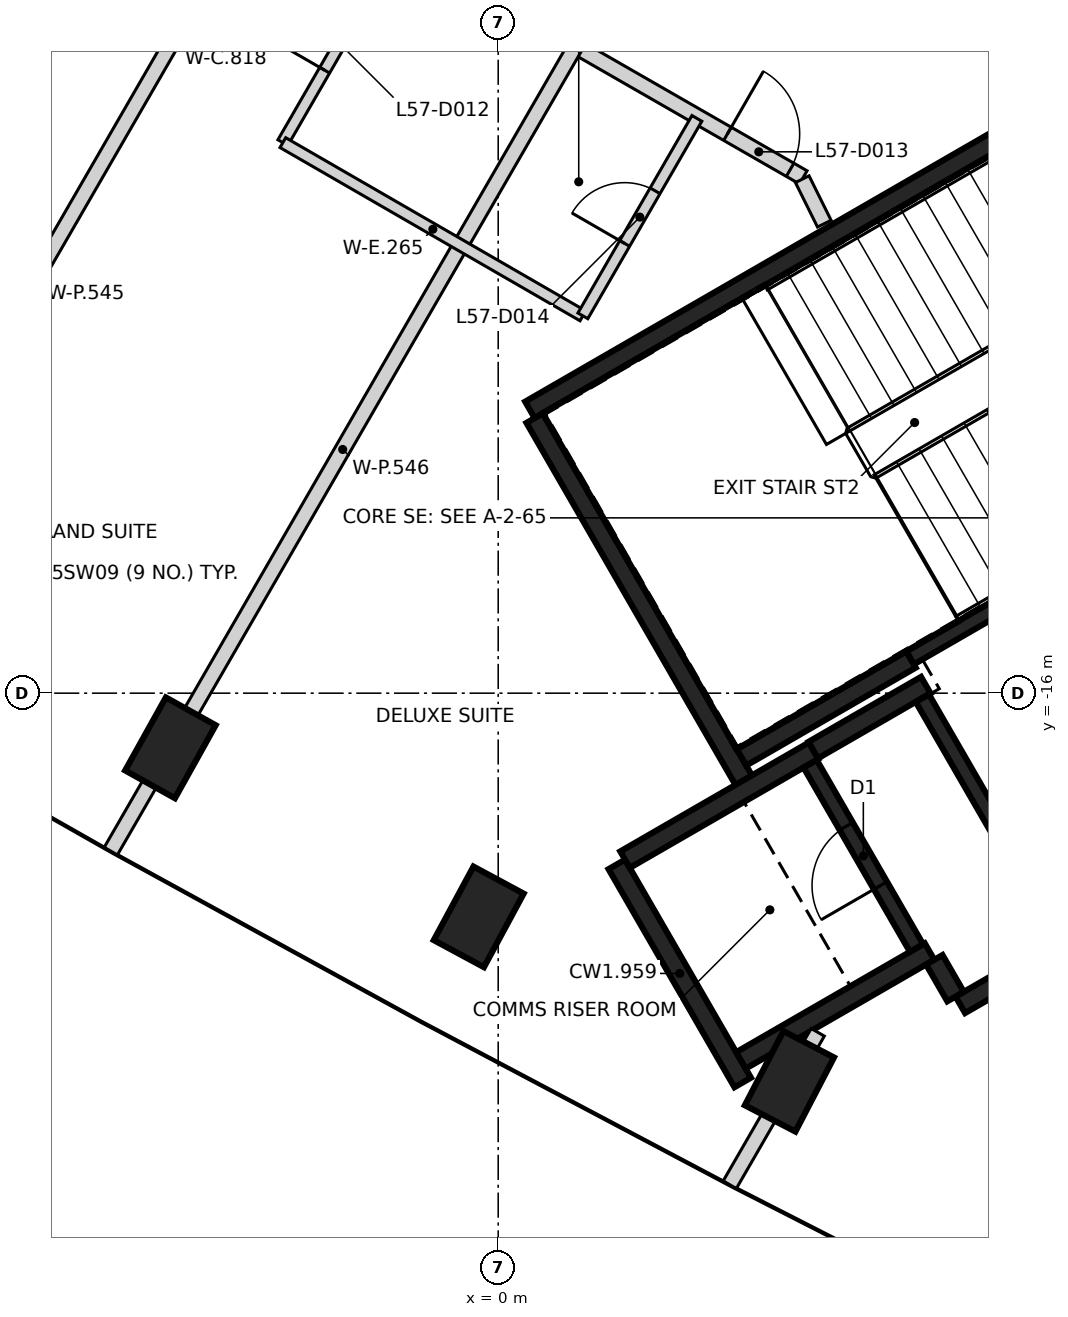
"""IFC4 building model, lengths in metres.
Left out: names, types, materials, properties, quantities, classifications, styles, units other than length and angle.
Written with IfcOpenShell. Run it as: python <this file> out.ifc"""

import sys

from ifc_helpers import new_model, si_unit, direction, frame, frame_2d, origin, origin_2d, place, context, subcontext, project, spatial, rectangle, extrude, element, fill, save


model = new_model("IFC4")
c1 = context("Model", 3, precision=1e-05, world=origin(), true_north=direction((0.0, 1.0)))
c2 = subcontext(c1, "Body", "Model", "MODEL_VIEW")
j1 = project(units=[si_unit("LENGTHUNIT", "METRE"), si_unit("PLANEANGLEUNIT", "RADIAN")], contexts=[c1])
p1 = place(None, origin())
s1 = spatial("IfcSite", under=j1, at=p1, CompositionType="ELEMENT")
p2 = place(p1, origin())
s2 = spatial("IfcBuilding", under=s1, at=p2, CompositionType="ELEMENT")
p3 = place(p2, frame((0.0, 0.0, 228.6)))
s3 = spatial("IfcBuildingStorey", under=s2, at=p3, CompositionType="ELEMENT", Elevation=228.6)
for number, where, z_axis, x_axis in (
    (1, (-4.312, -16.719, -0.35), (0.0, 0.0, 1.0), (0.487, 0.873, 0.0)),
    (2, (-0.256, -18.943, -0.35), (0.0, 0.0, 1.0), (0.475, 0.88, 0.0)),
    (3, (3.832, -21.107, -0.35), (0.0, 0.0, 1.0), (0.461, 0.887, 0.0)),
):
    element("IfcColumn", number, at=place(p3, frame(where, z_axis=z_axis, x_axis=x_axis)), inside=s3, PredefinedType="COLUMN", context=c2, shape_type="SweptSolid", body=[
        extrude(rectangle(XDim=1.1, YDim=0.75, at=origin_2d()), origin(), (0.0, 0.0, 1.0), 3.6),
    ])
p4 = place(p3, frame((0.417, -12.273, 0.0), z_axis=(0.0, 0.0, 1.0), x_axis=(0.866021906294, 0.500006057782, 0.0)))
e4 = element("IfcWall", 4, at=p4, inside=s3, PredefinedType="SHEAR", context=c2, shape_type="SweptSolid", body=[
    extrude(rectangle(XDim=11.55, YDim=0.25, at=frame_2d((5.775, 0.0))), origin(), (0.0, 0.0, 1.0), 3.25),
])
p5 = place(p4, frame((10.025, 0.0, 0.0)))
e5 = element("IfcOpeningElement", 5, at=p5, cuts=e4, PredefinedType="OPENING", context=c2, shape_type="SweptSolid", body=[
    extrude(rectangle(XDim=1.2, YDim=2.1, at=frame_2d((0.6, 1.05))), frame((0.0, 0.135, 0.0), z_axis=(0.0, -1.0, 0.0), x_axis=(1.0, 0.0, 0.0)), (0.0, 0.0, 1.0), 0.27),
])
p6 = place(p4, frame((8.725, 0.0, 0.0)))
e6 = element("IfcOpeningElement", 6, at=p6, cuts=e4, PredefinedType="OPENING", context=c2, shape_type="SweptSolid", body=[
    extrude(rectangle(XDim=1.2, YDim=2.1, at=frame_2d((0.6, 1.05))), frame((0.0, 0.135, 0.0), z_axis=(0.0, -1.0, 0.0), x_axis=(1.0, 0.0, 0.0)), (0.0, 0.0, 1.0), 0.27),
])
p7 = place(p3, frame((3.235, -17.153, 0.0), z_axis=(0.0, 0.0, 1.0), x_axis=(-0.500008851346, 0.866020293397, 0.0)))
e7 = element("IfcWall", 7, at=p7, inside=s3, PredefinedType="SHEAR", context=c2, shape_type="SweptSolid", body=[
    extrude(rectangle(XDim=5.51, YDim=0.25, at=frame_2d((2.755, 0.0))), origin(), (0.0, 0.0, 1.0), 3.25),
])
p8 = place(p3, frame((3.217, -21.122, 0.0), z_axis=(0.0, 0.0, 1.0), x_axis=(-0.499998874531, 0.866026053573, 0.0)))
e8 = element("IfcWall", 8, at=p8, inside=s3, PredefinedType="SHEAR", context=c2, shape_type="SweptSolid", body=[
    extrude(rectangle(XDim=3.313, YDim=0.25, at=frame_2d((1.656, 0.0))), origin(), (0.0, 0.0, 1.0), 3.25),
])
p9 = place(p3, frame((1.669, -18.19, 0.0), z_axis=(0.0, 0.0, 1.0), x_axis=(0.866042235819, 0.499970844928, 0.0)))
e9 = element("IfcWall", 9, at=p9, inside=s3, PredefinedType="SHEAR", context=c2, shape_type="SweptSolid", body=[
    extrude(rectangle(XDim=2.865, YDim=0.25, at=frame_2d((1.432, 0.0))), origin(), (0.0, 0.0, 1.0), 3.25),
])
p10 = place(p3, frame((5.675, -19.399, 0.0), z_axis=(0.0, 0.0, 1.0), x_axis=(-0.866026637627, -0.499997862916, 0.0)))
e10 = element("IfcWall", 10, at=p10, inside=s3, PredefinedType="SHEAR", context=c2, shape_type="SweptSolid", body=[
    extrude(rectangle(XDim=2.865, YDim=0.25, at=frame_2d((1.432, 0.0))), origin(), (0.0, 0.0, 1.0), 3.25),
])
p11 = place(p3, frame((5.431, -15.556, 0.0), z_axis=(0.0, 0.0, 1.0), x_axis=(-0.866022940537, -0.500004266446, 0.0)))
e11 = element("IfcWall", 11, at=p11, inside=s3, PredefinedType="SHEAR", context=c2, shape_type="SweptSolid", body=[
    extrude(rectangle(XDim=2.575, YDim=0.25, at=frame_2d((1.287, 0.0))), origin(), (0.0, 0.0, 1.0), 3.25),
])
p12 = place(p3, frame((4.145, -16.749, 0.0), z_axis=(0.0, 0.0, 1.0), x_axis=(0.866038183914, 0.499977863513, 0.0)))
e12 = element("IfcWall", 12, at=p12, inside=s3, PredefinedType="SHEAR", context=c2, shape_type="SweptSolid", body=[
    extrude(rectangle(XDim=1.71, YDim=0.25, at=frame_2d((0.855, 0.0))), origin(), (0.0, 0.0, 1.0), 3.25),
])
p13 = place(p3, frame((7.452, -19.308, 0.0), z_axis=(0.0, 0.0, 1.0), x_axis=(-0.866044474677, -0.49996696679, 0.0)))
e13 = element("IfcWall", 13, at=p13, inside=s3, PredefinedType="SHEAR", context=c2, shape_type="SweptSolid", body=[
    extrude(rectangle(XDim=1.584, YDim=0.25, at=frame_2d((0.792, 0.0))), origin(), (0.0, 0.0, 1.0), 3.25),
])
p14 = place(p3, frame((6.017, -19.992, 0.0), z_axis=(0.0, 0.0, 1.0), x_axis=(-0.500364886717, 0.865814633822, 0.0)))
e14 = element("IfcWall", 14, at=p14, inside=s3, PredefinedType="SHEAR", context=c2, shape_type="SweptSolid", body=[
    extrude(rectangle(XDim=0.559, YDim=0.25, at=frame_2d((0.28, 0.0))), origin(), (0.0, 0.0, 1.0), 3.25),
])
p15 = place(p3, frame((5.419, -15.534, 0.0), z_axis=(0.0, 0.0, 1.0), x_axis=(0.866029065029, 0.499993658486, 0.0)))
e15 = element("IfcWall", 15, at=p15, inside=s3, PredefinedType="SHEAR", context=c2, shape_type="SweptSolid", body=[
    extrude(rectangle(XDim=5.974, YDim=0.2, at=frame_2d((2.987, 0.0))), origin(), (0.0, 0.0, 1.0), 3.25),
])
p16 = place(p3, frame((5.503, -19.352, 0.0), z_axis=(0.0, 0.0, 1.0), x_axis=(-0.499986818241, 0.866033014143, 0.0)))
e16 = element("IfcWall", 16, at=p16, inside=s3, PredefinedType="SHEAR", context=c2, shape_type="SweptSolid", body=[
    extrude(rectangle(XDim=2.798, YDim=0.2, at=frame_2d((1.399, 0.0))), origin(), (0.0, 0.0, 1.0), 3.25),
])
p17 = place(p16, frame((0.949, 0.0, 0.0)))
e17 = element("IfcOpeningElement", 17, at=p17, cuts=e16, PredefinedType="OPENING", context=c2, shape_type="SweptSolid", body=[
    extrude(rectangle(XDim=0.9, YDim=2.1, at=frame_2d((0.45, 1.05))), frame((0.0, 0.11, 0.0), z_axis=(0.0, -1.0, 0.0), x_axis=(1.0, 0.0, 0.0)), (0.0, 0.0, 1.0), 0.22),
])
p18 = place(p3, frame((6.96, -18.455, 0.0), z_axis=(0.0, 0.0, 1.0), x_axis=(-0.499926705758, 0.866067716099, 0.0)))
e18 = element("IfcWall", 18, at=p18, inside=s3, PredefinedType="SHEAR", context=c2, shape_type="SweptSolid", body=[
    extrude(rectangle(XDim=2.759, YDim=0.2, at=frame_2d((1.38, 0.0))), origin(), (0.0, 0.0, 1.0), 3.25),
])
p19 = place(p3, frame((-7.089, -2.836, 0.0), z_axis=(0.0, 0.0, 1.0), x_axis=(0.867106243364, -0.498123240493, 0.0)))
e19 = element("IfcWall", 19, at=p19, inside=s3, PredefinedType="PARTITIONING", context=c2, shape_type="SweptSolid", body=[
    extrude(rectangle(XDim=12.804, YDim=0.2, at=frame_2d((6.402, 0.0))), origin(), (0.0, 0.0, 1.0), 3.25),
])
p20 = place(p19, frame((1.909, 0.0, 0.0)))
e20 = element("IfcOpeningElement", 20, at=p20, cuts=e19, PredefinedType="OPENING", context=c2, shape_type="SweptSolid", body=[
    extrude(rectangle(XDim=1.0, YDim=2.1, at=frame_2d((0.5, 1.05))), frame((0.0, 0.11, 0.0), z_axis=(0.0, -1.0, 0.0), x_axis=(1.0, 0.0, 0.0)), (0.0, 0.0, 1.0), 0.22),
])
p21 = place(p19, frame((4.91, 0.0, 0.0)))
e21 = element("IfcOpeningElement", 21, at=p21, cuts=e19, PredefinedType="OPENING", context=c2, shape_type="SweptSolid", body=[
    extrude(rectangle(XDim=0.95, YDim=2.1, at=frame_2d((0.475, 1.05))), frame((0.0, 0.11, 0.0), z_axis=(0.0, -1.0, 0.0), x_axis=(1.0, 0.0, 0.0)), (0.0, 0.0, 1.0), 0.22),
])
p22 = place(p19, frame((11.654, 0.0, 0.0)))
e22 = element("IfcOpeningElement", 22, at=p22, cuts=e19, PredefinedType="OPENING", context=c2, shape_type="SweptSolid", body=[
    extrude(rectangle(XDim=0.95, YDim=2.1, at=frame_2d((0.475, 1.05))), frame((0.0, 0.11, 0.0), z_axis=(0.0, -1.0, 0.0), x_axis=(1.0, 0.0, 0.0)), (0.0, 0.0, 1.0), 0.22),
])
p23 = place(p3, frame((4.0, -9.238, 0.0), z_axis=(0.0, 0.0, 1.0), x_axis=(0.444370954227, -0.89584287408, 0.0)))
e23 = element("IfcWall", 23, at=p23, inside=s3, PredefinedType="PARTITIONING", context=c2, shape_type="SweptSolid", body=[
    extrude(rectangle(XDim=0.653, YDim=0.2, at=frame_2d((0.327, 0.0))), origin(), (0.0, 0.0, 1.0), 3.25),
])
p24 = place(p3, frame((-9.119, -15.795, 0.0), z_axis=(0.0, 0.0, 1.0), x_axis=(0.50001601051, 0.866016159915, 0.0)))
e24 = element("IfcWall", 24, at=p24, inside=s3, PredefinedType="PARTITIONING", context=c2, shape_type="SweptSolid", body=[
    extrude(rectangle(XDim=12.238, YDim=0.2, at=frame_2d((6.119, 0.0))), origin(), (0.0, 0.0, 1.0), 3.25),
])
p25 = place(p3, frame((-5.097, -18.078, 0.0), z_axis=(0.0, 0.0, 1.0), x_axis=(0.499960272111, 0.866048339477, 0.0)))
e25 = element("IfcWall", 25, at=p25, inside=s3, PredefinedType="PARTITIONING", context=c2, shape_type="SweptSolid", body=[
    extrude(rectangle(XDim=12.204, YDim=0.2, at=frame_2d((6.102, 0.0))), origin(), (0.0, 0.0, 1.0), 3.25),
])
p26 = place(p3, frame((3.047, -22.467, 0.0), z_axis=(0.0, 0.0, 1.0), x_axis=(0.50001757531, 0.866015256437, 0.0)))
e26 = element("IfcWall", 26, at=p26, inside=s3, PredefinedType="PARTITIONING", context=c2, shape_type="SweptSolid", body=[
    extrude(rectangle(XDim=2.315, YDim=0.2, at=frame_2d((1.158, 0.0))), origin(), (0.0, 0.0, 1.0), 3.25),
])
p27 = place(p3, frame((-2.833, -8.757, 0.0), z_axis=(0.0, 0.0, 1.0), x_axis=(0.499990139034, 0.866031096941, 0.0)))
e27 = element("IfcWall", 27, at=p27, inside=s3, PredefinedType="PARTITIONING", context=c2, shape_type="SweptSolid", body=[
    extrude(rectangle(XDim=3.0, YDim=0.15, at=frame_2d((1.5, 0.0))), origin(), (0.0, 0.0, 1.0), 3.25),
])
p28 = place(p27, frame((1.1, 0.0, 0.0)))
e28 = element("IfcOpeningElement", 28, at=p28, cuts=e27, PredefinedType="OPENING", context=c2, shape_type="SweptSolid", body=[
    extrude(rectangle(XDim=0.8, YDim=2.1, at=frame_2d((0.4, 1.05))), frame((0.0, 0.085, 0.0), z_axis=(0.0, -1.0, 0.0), x_axis=(1.0, 0.0, 0.0)), (0.0, 0.0, 1.0), 0.17),
])
p29 = place(p3, frame((-2.833, -8.757, 0.0), z_axis=(0.0, 0.0, 1.0), x_axis=(0.866002713795, -0.500039298155, 0.0)))
e29 = element("IfcWall", 29, at=p29, inside=s3, PredefinedType="PARTITIONING", context=c2, shape_type="SweptSolid", body=[
    extrude(rectangle(XDim=4.558, YDim=0.15, at=frame_2d((2.279, 0.0))), origin(), (0.0, 0.0, 1.0), 3.25),
])
p30 = place(p3, frame((1.114, -11.036, 0.0), z_axis=(0.0, 0.0, 1.0), x_axis=(0.50002537861, 0.866010750942, 0.0)))
e30 = element("IfcWall", 30, at=p30, inside=s3, PredefinedType="PARTITIONING", context=c2, shape_type="SweptSolid", body=[
    extrude(rectangle(XDim=3.0, YDim=0.15, at=frame_2d((1.5, 0.0))), origin(), (0.0, 0.0, 1.0), 3.25),
])
p31 = place(p30, frame((1.1, 0.0, 0.0)))
e31 = element("IfcOpeningElement", 31, at=p31, cuts=e30, PredefinedType="OPENING", context=c2, shape_type="SweptSolid", body=[
    extrude(rectangle(XDim=0.8, YDim=2.1, at=frame_2d((0.4, 1.05))), frame((0.0, 0.085, 0.0), z_axis=(0.0, -1.0, 0.0), x_axis=(1.0, 0.0, 0.0)), (0.0, 0.0, 1.0), 0.17),
])
p32 = place(p17, origin())
e32 = element("IfcDoor", 32, at=p32, inside=s3, OperationType="SINGLE_SWING_LEFT", PredefinedType="DOOR", context=c2, shape_type="SweptSolid", body=[
    extrude(rectangle(XDim=0.9, YDim=2.1, at=frame_2d((0.45, 1.05))), frame((0.0, 0.025, 0.0), z_axis=(0.0, -1.0, 0.0), x_axis=(1.0, 0.0, 0.0)), (0.0, 0.0, 1.0), 0.05),
])
fill(e17, e32)
p33 = place(p28, frame((0.8, 0.0, 0.0), z_axis=(0.0, 0.0, 1.0), x_axis=(-1.0, 0.0, 0.0)))
e33 = element("IfcDoor", 33, at=p33, inside=s3, OperationType="SINGLE_SWING_LEFT", PredefinedType="DOOR", context=c2, shape_type="SweptSolid", body=[
    extrude(rectangle(XDim=0.8, YDim=2.1, at=frame_2d((0.4, 1.05))), frame((0.0, 0.025, 0.0), z_axis=(0.0, -1.0, 0.0), x_axis=(1.0, 0.0, 0.0)), (0.0, 0.0, 1.0), 0.05),
])
fill(e28, e33)
p34 = place(p22, frame((0.95, 0.0, 0.0), z_axis=(0.0, 0.0, 1.0), x_axis=(-1.0, 0.0, 0.0)))
e34 = element("IfcDoor", 34, at=p34, inside=s3, OperationType="SINGLE_SWING_LEFT", PredefinedType="DOOR", context=c2, shape_type="SweptSolid", body=[
    extrude(rectangle(XDim=0.95, YDim=2.1, at=frame_2d((0.475, 1.05))), frame((0.0, 0.025, 0.0), z_axis=(0.0, -1.0, 0.0), x_axis=(1.0, 0.0, 0.0)), (0.0, 0.0, 1.0), 0.05),
])
fill(e22, e34)
p35 = place(p31, origin())
e35 = element("IfcDoor", 35, at=p35, inside=s3, OperationType="SINGLE_SWING_LEFT", PredefinedType="DOOR", context=c2, shape_type="SweptSolid", body=[
    extrude(rectangle(XDim=0.8, YDim=2.1, at=frame_2d((0.4, 1.05))), frame((0.0, 0.025, 0.0), z_axis=(0.0, -1.0, 0.0), x_axis=(1.0, 0.0, 0.0)), (0.0, 0.0, 1.0), 0.05),
])
fill(e31, e35)
save(model, sys.argv[1])
